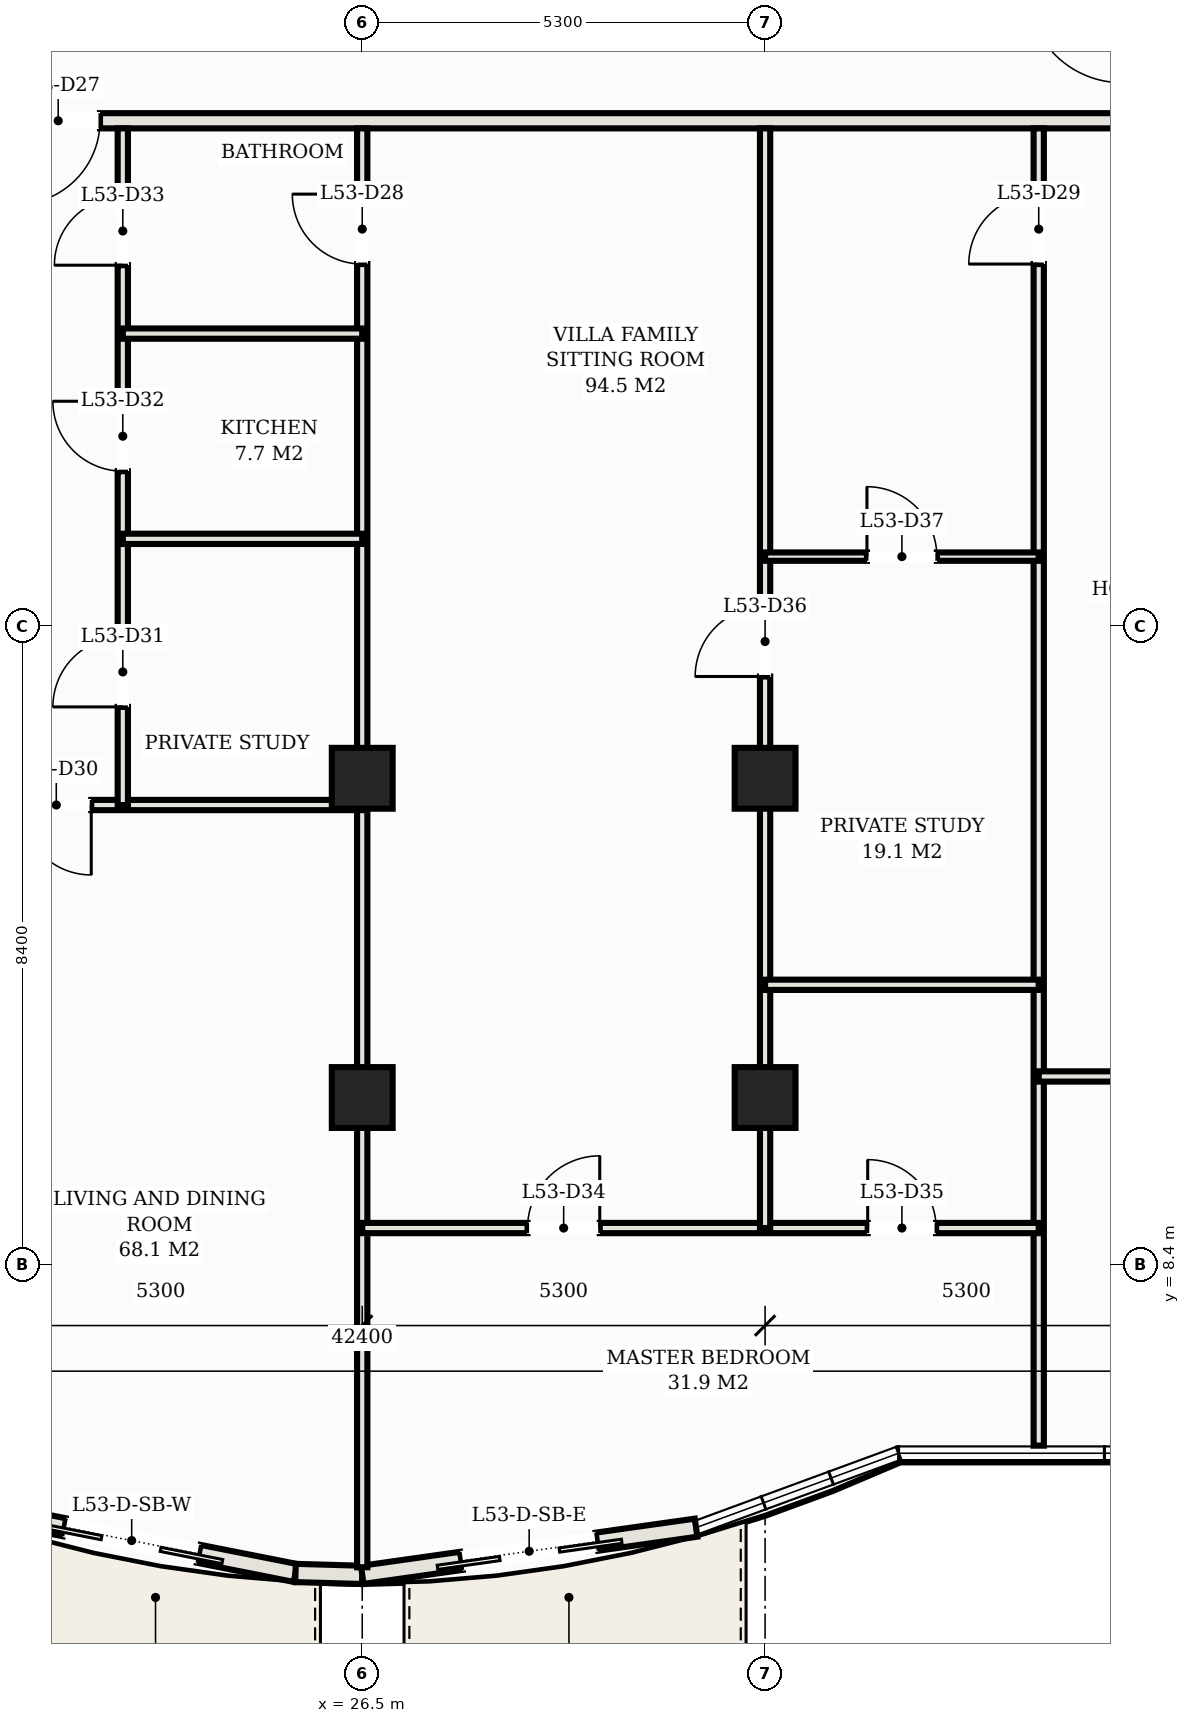
"""IFC4 building model, lengths in metres.
Left out: names, types, materials, properties, quantities, classifications, styles, units other than length and angle.
Written with IfcOpenShell. Run it as: python <this file> out.ifc"""

import sys

from ifc_helpers import new_model, si_unit, direction, frame, frame_2d, origin, origin_2d, place, context, subcontext, project, spatial, rectangle, hollow_rectangle, extrude, element, fill, save


model = new_model("IFC4")
c1 = context("Model", 3, precision=1e-05, world=origin(), true_north=direction((0.0, 1.0)))
c2 = subcontext(c1, "Body", "Model", "MODEL_VIEW")
j1 = project(units=[si_unit("LENGTHUNIT", "METRE"), si_unit("PLANEANGLEUNIT", "RADIAN")], contexts=[c1])
p1 = place(None, origin())
s1 = spatial("IfcSite", under=j1, at=p1, CompositionType="ELEMENT")
p2 = place(p1, origin())
s2 = spatial("IfcBuilding", under=s1, at=p2, CompositionType="ELEMENT")
p3 = place(p2, frame((0.0, 0.0, 196.7)))
s3 = spatial("IfcBuildingStorey", under=s2, at=p3, CompositionType="ELEMENT", Elevation=196.7)
for number, where, z_axis, x_axis in (
    (1, (26.5, 14.8, 0.0), (0.0, 0.0, 1.0), (1.0, 0.0, 0.0)),
    (2, (26.5, 10.6, 0.0), (0.0, 0.0, 1.0), (1.0, 0.0, 0.0)),
    (3, (31.8, 14.8, 0.0), (0.0, 0.0, 1.0), (1.0, 0.0, 0.0)),
    (4, (31.8, 10.6, 0.0), (0.0, 0.0, 1.0), (1.0, 0.0, 0.0)),
):
    element("IfcColumn", number, at=place(p3, frame(where, z_axis=z_axis, x_axis=x_axis)), inside=s3, PredefinedType="COLUMN", context=c2, shape_type="SweptSolid", body=[
        extrude(hollow_rectangle(XDim=0.8, YDim=0.8, WallThickness=0.028, at=origin_2d()), origin(), (0.0, 0.0, 1.0), 3.3),
    ])
p4 = place(p3, frame((21.229, 5.214, 0.0), z_axis=(0.0, 0.0, 1.0), x_axis=(0.980985349685, -0.194081796425, 0.0)))
e5 = element("IfcWall", 5, at=p4, inside=s3, PredefinedType="SOLIDWALL", context=c2, shape_type="SweptSolid", body=[
    extrude(rectangle(XDim=4.478, YDim=0.24, at=frame_2d((2.239, 0.0))), origin(), (0.0, 0.0, 1.0), 3.11),
])
p5 = place(p4, frame((1.381, 0.0, 0.0)))
e6 = element("IfcOpeningElement", 6, at=p5, cuts=e5, PredefinedType="OPENING", context=c2, shape_type="SweptSolid", body=[
    extrude(rectangle(XDim=1.8, YDim=2.2, at=frame_2d((0.9, 1.1))), frame((0.0, 0.13, 0.0), z_axis=(0.0, -1.0, 0.0), x_axis=(1.0, 0.0, 0.0)), (0.0, 0.0, 1.0), 0.26),
])
p6 = place(p3, frame((25.622, 4.345, 0.0), z_axis=(0.0, 0.0, 1.0), x_axis=(0.999597960231, -0.028353446035, 0.0)))
e7 = element("IfcWall", 7, at=p6, inside=s3, PredefinedType="SOLIDWALL", context=c2, shape_type="SweptSolid", body=[
    extrude(rectangle(XDim=0.878, YDim=0.24, at=frame_2d((0.439, 0.0))), origin(), (0.0, 0.0, 1.0), 3.11),
])
p7 = place(p3, frame((26.5, 4.32, 0.0), z_axis=(0.0, 0.0, 1.0), x_axis=(0.990156470874, 0.139964864115, 0.0)))
e8 = element("IfcWall", 8, at=p7, inside=s3, PredefinedType="SOLIDWALL", context=c2, shape_type="SweptSolid", body=[
    extrude(rectangle(XDim=4.436, YDim=0.24, at=frame_2d((2.218, 0.0))), origin(), (0.0, 0.0, 1.0), 3.11),
])
p8 = place(p7, frame((1.318, 0.0, 0.0)))
e9 = element("IfcOpeningElement", 9, at=p8, cuts=e8, PredefinedType="OPENING", context=c2, shape_type="SweptSolid", body=[
    extrude(rectangle(XDim=1.8, YDim=2.2, at=frame_2d((0.9, 1.1))), frame((0.0, 0.13, 0.0), z_axis=(0.0, -1.0, 0.0), x_axis=(1.0, 0.0, 0.0)), (0.0, 0.0, 1.0), 0.26),
])
p9 = place(p3, frame((6.72, 23.45, 0.0), z_axis=(0.0, 0.0, 1.0), x_axis=(1.0, 0.0, 0.0)))
e10 = element("IfcWall", 10, at=p9, inside=s3, PredefinedType="PARTITIONING", context=c2, shape_type="SweptSolid", body=[
    extrude(rectangle(XDim=39.56, YDim=0.2, at=frame_2d((19.78, 0.0))), origin(), (0.0, 0.0, 1.0), 2.43),
])
p10 = place(p9, frame((4.63, 0.0, 0.0)))
e11 = element("IfcOpeningElement", 11, at=p10, cuts=e10, PredefinedType="OPENING", context=c2, shape_type="SweptSolid", body=[
    extrude(rectangle(XDim=1.1, YDim=2.25, at=frame_2d((0.55, 1.125))), frame((0.0, 0.11, 0.0), z_axis=(0.0, -1.0, 0.0), x_axis=(1.0, 0.0, 0.0)), (0.0, 0.0, 1.0), 0.22),
])
p11 = place(p9, frame((9.93, 0.0, 0.0)))
e12 = element("IfcOpeningElement", 12, at=p11, cuts=e10, PredefinedType="OPENING", context=c2, shape_type="SweptSolid", body=[
    extrude(rectangle(XDim=1.1, YDim=2.25, at=frame_2d((0.55, 1.125))), frame((0.0, 0.11, 0.0), z_axis=(0.0, -1.0, 0.0), x_axis=(1.0, 0.0, 0.0)), (0.0, 0.0, 1.0), 0.22),
])
p12 = place(p9, frame((15.23, 0.0, 0.0)))
e13 = element("IfcOpeningElement", 13, at=p12, cuts=e10, PredefinedType="OPENING", context=c2, shape_type="SweptSolid", body=[
    extrude(rectangle(XDim=1.1, YDim=2.25, at=frame_2d((0.55, 1.125))), frame((0.0, 0.11, 0.0), z_axis=(0.0, -1.0, 0.0), x_axis=(1.0, 0.0, 0.0)), (0.0, 0.0, 1.0), 0.22),
])
p13 = place(p9, frame((1.635, 0.0, 0.0)))
e14 = element("IfcOpeningElement", 14, at=p13, cuts=e10, PredefinedType="OPENING", context=c2, shape_type="SweptSolid", body=[
    extrude(rectangle(XDim=0.92, YDim=2.15, at=frame_2d((0.46, 1.075))), frame((0.0, 0.11, 0.0), z_axis=(0.0, -1.0, 0.0), x_axis=(1.0, 0.0, 0.0)), (0.0, 0.0, 1.0), 0.22),
])
p14 = place(p9, frame((37.005, 0.0, 0.0)))
e15 = element("IfcOpeningElement", 15, at=p14, cuts=e10, PredefinedType="OPENING", context=c2, shape_type="SweptSolid", body=[
    extrude(rectangle(XDim=0.92, YDim=2.15, at=frame_2d((0.46, 1.075))), frame((0.0, 0.11, 0.0), z_axis=(0.0, -1.0, 0.0), x_axis=(1.0, 0.0, 0.0)), (0.0, 0.0, 1.0), 0.22),
])
p15 = place(p3, frame((26.5, 4.42, 0.0), z_axis=(0.0, 0.0, 1.0), x_axis=(0.0, 1.0, 0.0)))
e16 = element("IfcWall", 16, at=p15, inside=s3, PredefinedType="PARTITIONING", context=c2, shape_type="SweptSolid", body=[
    extrude(rectangle(XDim=18.93, YDim=0.135, at=frame_2d((9.465, 0.0))), origin(), (0.0, 0.0, 1.0), 2.43),
])
p16 = place(p15, frame((17.145, 0.0, 0.0)))
e17 = element("IfcOpeningElement", 17, at=p16, cuts=e16, PredefinedType="OPENING", context=c2, shape_type="SweptSolid", body=[
    extrude(rectangle(XDim=0.92, YDim=2.15, at=frame_2d((0.46, 1.075))), frame((0.0, 0.078, 0.0), z_axis=(0.0, -1.0, 0.0), x_axis=(1.0, 0.0, 0.0)), (0.0, 0.0, 1.0), 0.155),
])
p17 = place(p3, frame((35.4, 6.02, 0.0), z_axis=(0.0, 0.0, 1.0), x_axis=(0.0, 1.0, 0.0)))
e18 = element("IfcWall", 18, at=p17, inside=s3, PredefinedType="PARTITIONING", context=c2, shape_type="SweptSolid", body=[
    extrude(rectangle(XDim=17.33, YDim=0.135, at=frame_2d((8.665, 0.0))), origin(), (0.0, 0.0, 1.0), 2.43),
])
p18 = place(p17, frame((15.545, 0.0, 0.0)))
e19 = element("IfcOpeningElement", 19, at=p18, cuts=e18, PredefinedType="OPENING", context=c2, shape_type="SweptSolid", body=[
    extrude(rectangle(XDim=0.92, YDim=2.15, at=frame_2d((0.46, 1.075))), frame((0.0, 0.078, 0.0), z_axis=(0.0, -1.0, 0.0), x_axis=(1.0, 0.0, 0.0)), (0.0, 0.0, 1.0), 0.155),
])
p19 = place(p3, frame((21.2, 14.448, 0.0), z_axis=(0.0, 0.0, 1.0), x_axis=(1.0, 0.0, 0.0)))
e20 = element("IfcWall", 20, at=p19, inside=s3, PredefinedType="PARTITIONING", context=c2, shape_type="SweptSolid", body=[
    extrude(rectangle(XDim=5.3, YDim=0.135, at=frame_2d((2.65, 0.0))), origin(), (0.0, 0.0, 1.0), 2.43),
])
p20 = place(p19, frame((0.815, 0.0, 0.0)))
e21 = element("IfcOpeningElement", 21, at=p20, cuts=e20, PredefinedType="OPENING", context=c2, shape_type="SweptSolid", body=[
    extrude(rectangle(XDim=0.92, YDim=2.15, at=frame_2d((0.46, 1.075))), frame((0.0, 0.078, 0.0), z_axis=(0.0, -1.0, 0.0), x_axis=(1.0, 0.0, 0.0)), (0.0, 0.0, 1.0), 0.155),
])
p21 = place(p3, frame((23.35, 14.448, 0.0), z_axis=(0.0, 0.0, 1.0), x_axis=(0.0, 1.0, 0.0)))
e22 = element("IfcWall", 22, at=p21, inside=s3, PredefinedType="PARTITIONING", context=c2, shape_type="SweptSolid", body=[
    extrude(rectangle(XDim=8.902, YDim=0.135, at=frame_2d((4.451, 0.0))), origin(), (0.0, 0.0, 1.0), 2.43),
])
p22 = place(p21, frame((1.291, 0.0, 0.0)))
e23 = element("IfcOpeningElement", 23, at=p22, cuts=e22, PredefinedType="OPENING", context=c2, shape_type="SweptSolid", body=[
    extrude(rectangle(XDim=0.92, YDim=2.15, at=frame_2d((0.46, 1.075))), frame((0.0, 0.078, 0.0), z_axis=(0.0, -1.0, 0.0), x_axis=(1.0, 0.0, 0.0)), (0.0, 0.0, 1.0), 0.155),
])
p23 = place(p21, frame((4.392, 0.0, 0.0)))
e24 = element("IfcOpeningElement", 24, at=p23, cuts=e22, PredefinedType="OPENING", context=c2, shape_type="SweptSolid", body=[
    extrude(rectangle(XDim=0.92, YDim=2.15, at=frame_2d((0.46, 1.075))), frame((0.0, 0.078, 0.0), z_axis=(0.0, -1.0, 0.0), x_axis=(1.0, 0.0, 0.0)), (0.0, 0.0, 1.0), 0.155),
])
p24 = place(p21, frame((7.102, 0.0, 0.0)))
e25 = element("IfcOpeningElement", 25, at=p24, cuts=e22, PredefinedType="OPENING", context=c2, shape_type="SweptSolid", body=[
    extrude(rectangle(XDim=0.9, YDim=2.15, at=frame_2d((0.45, 1.075))), frame((0.0, 0.078, 0.0), z_axis=(0.0, -1.0, 0.0), x_axis=(1.0, 0.0, 0.0)), (0.0, 0.0, 1.0), 0.155),
])
for number, where, z_axis, x_axis in (
    (26, (23.35, 17.95, 0.0), (0.0, 0.0, 1.0), (1.0, 0.0, 0.0)),
    (27, (23.35, 20.65, 0.0), (0.0, 0.0, 1.0), (1.0, 0.0, 0.0)),
):
    element("IfcWall", number, at=place(p3, frame(where, z_axis=z_axis, x_axis=x_axis)), inside=s3, PredefinedType="PARTITIONING", context=c2, shape_type="SweptSolid", body=[
        extrude(rectangle(XDim=3.15, YDim=0.135, at=frame_2d((1.575, 0.0))), origin(), (0.0, 0.0, 1.0), 2.43),
    ])
p25 = place(p3, frame((26.5, 8.883, 0.0), z_axis=(0.0, 0.0, 1.0), x_axis=(1.0, 0.0, 0.0)))
e28 = element("IfcWall", 28, at=p25, inside=s3, PredefinedType="PARTITIONING", context=c2, shape_type="SweptSolid", body=[
    extrude(rectangle(XDim=8.9, YDim=0.135, at=frame_2d((4.45, 0.0))), origin(), (0.0, 0.0, 1.0), 2.43),
])
p26 = place(p25, frame((2.175, 0.0, 0.0)))
e29 = element("IfcOpeningElement", 29, at=p26, cuts=e28, PredefinedType="OPENING", context=c2, shape_type="SweptSolid", body=[
    extrude(rectangle(XDim=0.95, YDim=2.15, at=frame_2d((0.475, 1.075))), frame((0.0, 0.078, 0.0), z_axis=(0.0, -1.0, 0.0), x_axis=(1.0, 0.0, 0.0)), (0.0, 0.0, 1.0), 0.155),
])
p27 = place(p25, frame((6.65, 0.0, 0.0)))
e30 = element("IfcOpeningElement", 30, at=p27, cuts=e28, PredefinedType="OPENING", context=c2, shape_type="SweptSolid", body=[
    extrude(rectangle(XDim=0.9, YDim=2.15, at=frame_2d((0.45, 1.075))), frame((0.0, 0.078, 0.0), z_axis=(0.0, -1.0, 0.0), x_axis=(1.0, 0.0, 0.0)), (0.0, 0.0, 1.0), 0.155),
])
p28 = place(p3, frame((31.8, 8.883, 0.0), z_axis=(0.0, 0.0, 1.0), x_axis=(0.0, 1.0, 0.0)))
e31 = element("IfcWall", 31, at=p28, inside=s3, PredefinedType="PARTITIONING", context=c2, shape_type="SweptSolid", body=[
    extrude(rectangle(XDim=14.467, YDim=0.135, at=frame_2d((7.233, 0.0))), origin(), (0.0, 0.0, 1.0), 2.43),
])
p29 = place(p28, frame((7.256, 0.0, 0.0)))
e32 = element("IfcOpeningElement", 32, at=p29, cuts=e31, PredefinedType="OPENING", context=c2, shape_type="SweptSolid", body=[
    extrude(rectangle(XDim=0.92, YDim=2.15, at=frame_2d((0.46, 1.075))), frame((0.0, 0.078, 0.0), z_axis=(0.0, -1.0, 0.0), x_axis=(1.0, 0.0, 0.0)), (0.0, 0.0, 1.0), 0.155),
])
p30 = place(p3, frame((31.8, 12.083, 0.0), z_axis=(0.0, 0.0, 1.0), x_axis=(1.0, 0.0, 0.0)))
e33 = element("IfcWall", 33, at=p30, inside=s3, PredefinedType="PARTITIONING", context=c2, shape_type="SweptSolid", body=[
    extrude(rectangle(XDim=3.6, YDim=0.135, at=frame_2d((1.8, 0.0))), origin(), (0.0, 0.0, 1.0), 2.43),
])
p31 = place(p3, frame((31.8, 17.716, 0.0), z_axis=(0.0, 0.0, 1.0), x_axis=(1.0, 0.0, 0.0)))
e34 = element("IfcWall", 34, at=p31, inside=s3, PredefinedType="MOVABLE", context=c2, shape_type="SweptSolid", body=[
    extrude(rectangle(XDim=3.6, YDim=0.11, at=frame_2d((1.8, 0.0))), origin(), (0.0, 0.0, 1.0), 2.43),
])
p32 = place(p31, frame((1.34, 0.0, 0.0)))
e35 = element("IfcOpeningElement", 35, at=p32, cuts=e34, PredefinedType="OPENING", context=c2, shape_type="SweptSolid", body=[
    extrude(rectangle(XDim=0.92, YDim=2.15, at=frame_2d((0.46, 1.075))), frame((0.0, 0.065, 0.0), z_axis=(0.0, -1.0, 0.0), x_axis=(1.0, 0.0, 0.0)), (0.0, 0.0, 1.0), 0.13),
])
p33 = place(p3, frame((35.4, 10.877, 0.0), z_axis=(0.0, 0.0, 1.0), x_axis=(1.0, 0.0, 0.0)))
e36 = element("IfcWall", 36, at=p33, inside=s3, PredefinedType="PARTITIONING", context=c2, shape_type="SweptSolid", body=[
    extrude(rectangle(XDim=7.0, YDim=0.135, at=frame_2d((3.5, 0.0))), origin(), (0.0, 0.0, 1.0), 2.43),
])
p34 = place(p33, frame((2.175, 0.0, 0.0)))
e37 = element("IfcOpeningElement", 37, at=p34, cuts=e36, PredefinedType="OPENING", context=c2, shape_type="SweptSolid", body=[
    extrude(rectangle(XDim=0.95, YDim=2.15, at=frame_2d((0.475, 1.075))), frame((0.0, 0.078, 0.0), z_axis=(0.0, -1.0, 0.0), x_axis=(1.0, 0.0, 0.0)), (0.0, 0.0, 1.0), 0.155),
])
p35 = place(p5, frame((1.8, 0.0, 0.0), z_axis=(0.0, 0.0, 1.0), x_axis=(-1.0, 0.0, 0.0)))
e38 = element("IfcDoor", 38, at=p35, inside=s3, OperationType="DOUBLE_DOOR_SLIDING", PredefinedType="DOOR", context=c2, shape_type="SweptSolid", body=[
    extrude(rectangle(XDim=1.8, YDim=2.2, at=frame_2d((0.9, 1.1))), frame((0.0, 0.025, 0.0), z_axis=(0.0, -1.0, 0.0), x_axis=(1.0, 0.0, 0.0)), (0.0, 0.0, 1.0), 0.05),
])
fill(e6, e38)
p36 = place(p8, frame((1.8, 0.0, 0.0), z_axis=(0.0, 0.0, 1.0), x_axis=(-1.0, 0.0, 0.0)))
e39 = element("IfcDoor", 39, at=p36, inside=s3, OperationType="DOUBLE_DOOR_SLIDING", PredefinedType="DOOR", context=c2, shape_type="SweptSolid", body=[
    extrude(rectangle(XDim=1.8, YDim=2.2, at=frame_2d((0.9, 1.1))), frame((0.0, 0.025, 0.0), z_axis=(0.0, -1.0, 0.0), x_axis=(1.0, 0.0, 0.0)), (0.0, 0.0, 1.0), 0.05),
])
fill(e9, e39)
p37 = place(p12, frame((1.1, 0.0, 0.0), z_axis=(0.0, 0.0, 1.0), x_axis=(-1.0, 0.0, 0.0)))
e40 = element("IfcDoor", 40, at=p37, inside=s3, OperationType="SINGLE_SWING_RIGHT", PredefinedType="DOOR", context=c2, shape_type="SweptSolid", body=[
    extrude(rectangle(XDim=1.1, YDim=2.25, at=frame_2d((0.55, 1.125))), frame((0.0, 0.025, 0.0), z_axis=(0.0, -1.0, 0.0), x_axis=(1.0, 0.0, 0.0)), (0.0, 0.0, 1.0), 0.05),
])
fill(e13, e40)
p38 = place(p16, origin())
e41 = element("IfcDoor", 41, at=p38, inside=s3, OperationType="SINGLE_SWING_RIGHT", PredefinedType="DOOR", context=c2, shape_type="SweptSolid", body=[
    extrude(rectangle(XDim=0.92, YDim=2.15, at=frame_2d((0.46, 1.075))), frame((0.0, 0.025, 0.0), z_axis=(0.0, -1.0, 0.0), x_axis=(1.0, 0.0, 0.0)), (0.0, 0.0, 1.0), 0.05),
])
fill(e17, e41)
p39 = place(p18, origin())
e42 = element("IfcDoor", 42, at=p39, inside=s3, OperationType="SINGLE_SWING_LEFT", PredefinedType="DOOR", context=c2, shape_type="SweptSolid", body=[
    extrude(rectangle(XDim=0.92, YDim=2.15, at=frame_2d((0.46, 1.075))), frame((0.0, 0.025, 0.0), z_axis=(0.0, -1.0, 0.0), x_axis=(1.0, 0.0, 0.0)), (0.0, 0.0, 1.0), 0.05),
])
fill(e19, e42)
p40 = place(p20, frame((0.92, 0.0, 0.0), z_axis=(0.0, 0.0, 1.0), x_axis=(-1.0, 0.0, 0.0)))
e43 = element("IfcDoor", 43, at=p40, inside=s3, OperationType="SINGLE_SWING_LEFT", PredefinedType="DOOR", context=c2, shape_type="SweptSolid", body=[
    extrude(rectangle(XDim=0.92, YDim=2.15, at=frame_2d((0.46, 1.075))), frame((0.0, 0.025, 0.0), z_axis=(0.0, -1.0, 0.0), x_axis=(1.0, 0.0, 0.0)), (0.0, 0.0, 1.0), 0.05),
])
fill(e21, e43)
p41 = place(p22, origin())
e44 = element("IfcDoor", 44, at=p41, inside=s3, OperationType="SINGLE_SWING_LEFT", PredefinedType="DOOR", context=c2, shape_type="SweptSolid", body=[
    extrude(rectangle(XDim=0.92, YDim=2.15, at=frame_2d((0.46, 1.075))), frame((0.0, 0.025, 0.0), z_axis=(0.0, -1.0, 0.0), x_axis=(1.0, 0.0, 0.0)), (0.0, 0.0, 1.0), 0.05),
])
fill(e23, e44)
p42 = place(p23, origin())
e45 = element("IfcDoor", 45, at=p42, inside=s3, OperationType="SINGLE_SWING_RIGHT", PredefinedType="DOOR", context=c2, shape_type="SweptSolid", body=[
    extrude(rectangle(XDim=0.92, YDim=2.15, at=frame_2d((0.46, 1.075))), frame((0.0, 0.025, 0.0), z_axis=(0.0, -1.0, 0.0), x_axis=(1.0, 0.0, 0.0)), (0.0, 0.0, 1.0), 0.05),
])
fill(e24, e45)
p43 = place(p24, origin())
e46 = element("IfcDoor", 46, at=p43, inside=s3, OperationType="SINGLE_SWING_LEFT", PredefinedType="DOOR", context=c2, shape_type="SweptSolid", body=[
    extrude(rectangle(XDim=0.9, YDim=2.15, at=frame_2d((0.45, 1.075))), frame((0.0, 0.025, 0.0), z_axis=(0.0, -1.0, 0.0), x_axis=(1.0, 0.0, 0.0)), (0.0, 0.0, 1.0), 0.05),
])
fill(e25, e46)
p44 = place(p26, origin())
e47 = element("IfcDoor", 47, at=p44, inside=s3, OperationType="SINGLE_SWING_RIGHT", PredefinedType="DOOR", context=c2, shape_type="SweptSolid", body=[
    extrude(rectangle(XDim=0.95, YDim=2.15, at=frame_2d((0.475, 1.075))), frame((0.0, 0.025, 0.0), z_axis=(0.0, -1.0, 0.0), x_axis=(1.0, 0.0, 0.0)), (0.0, 0.0, 1.0), 0.05),
])
fill(e29, e47)
p45 = place(p27, origin())
e48 = element("IfcDoor", 48, at=p45, inside=s3, OperationType="SINGLE_SWING_LEFT", PredefinedType="DOOR", context=c2, shape_type="SweptSolid", body=[
    extrude(rectangle(XDim=0.9, YDim=2.15, at=frame_2d((0.45, 1.075))), frame((0.0, 0.025, 0.0), z_axis=(0.0, -1.0, 0.0), x_axis=(1.0, 0.0, 0.0)), (0.0, 0.0, 1.0), 0.05),
])
fill(e30, e48)
p46 = place(p29, origin())
e49 = element("IfcDoor", 49, at=p46, inside=s3, OperationType="SINGLE_SWING_LEFT", PredefinedType="DOOR", context=c2, shape_type="SweptSolid", body=[
    extrude(rectangle(XDim=0.92, YDim=2.15, at=frame_2d((0.46, 1.075))), frame((0.0, 0.025, 0.0), z_axis=(0.0, -1.0, 0.0), x_axis=(1.0, 0.0, 0.0)), (0.0, 0.0, 1.0), 0.05),
])
fill(e32, e49)
p47 = place(p32, origin())
e50 = element("IfcDoor", 50, at=p47, inside=s3, OperationType="SINGLE_SWING_LEFT", PredefinedType="DOOR", context=c2, shape_type="SweptSolid", body=[
    extrude(rectangle(XDim=0.92, YDim=2.15, at=frame_2d((0.46, 1.075))), frame((0.0, 0.025, 0.0), z_axis=(0.0, -1.0, 0.0), x_axis=(1.0, 0.0, 0.0)), (0.0, 0.0, 1.0), 0.05),
])
fill(e35, e50)
save(model, sys.argv[1])
